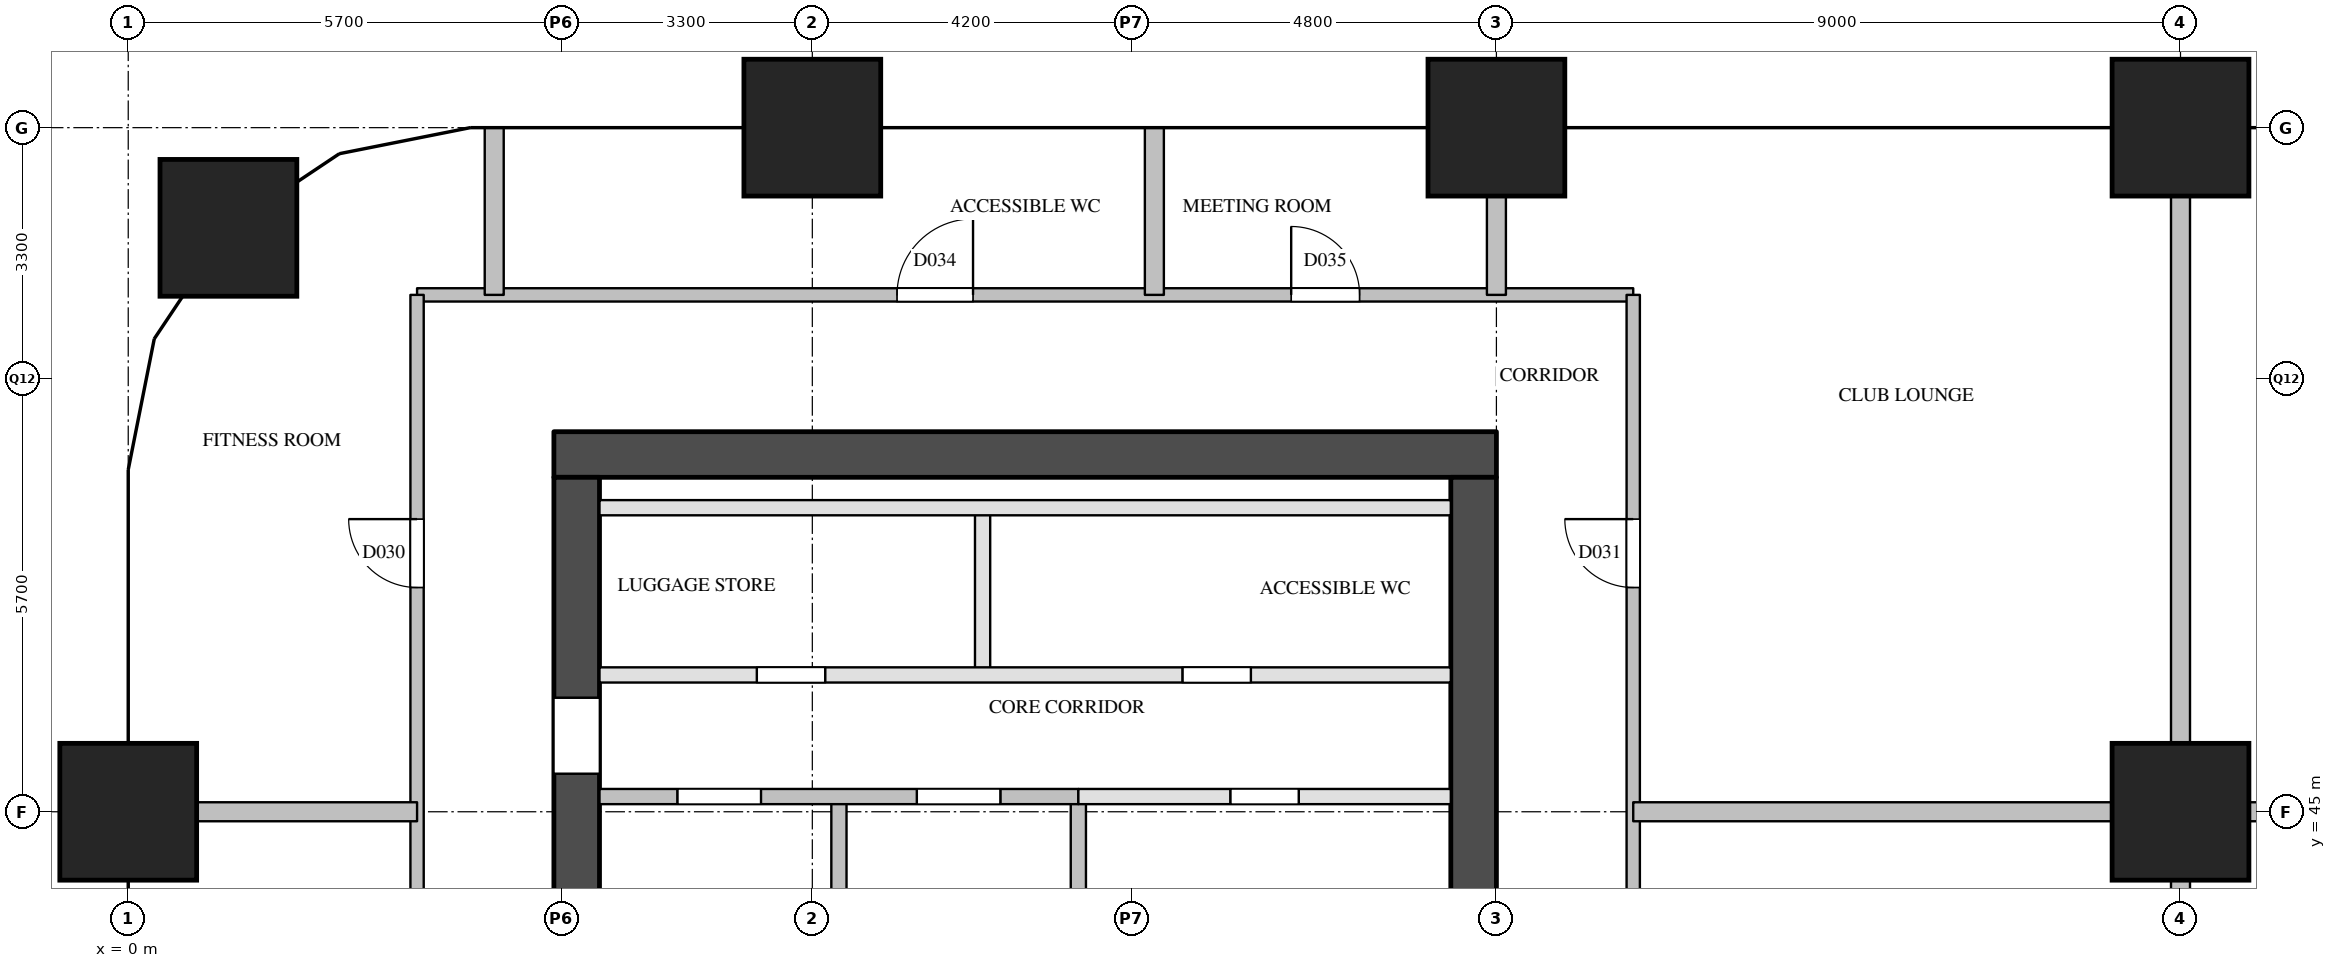
"""IFC4 building model, lengths in metres.
Left out: names, types, materials, properties, quantities, classifications, styles, units other than length and angle.
Written with IfcOpenShell. Run it as: python <this file> out.ifc"""

import sys

from ifc_helpers import new_model, si_unit, direction, frame, frame_2d, origin, origin_2d, place, context, subcontext, project, spatial, rectangle, extrude, element, fill, save


model = new_model("IFC4")
c1 = context("Model", 3, precision=1e-05, world=origin(), true_north=direction((0.0, 1.0)))
c2 = subcontext(c1, "Body", "Model", "MODEL_VIEW")
j1 = project(units=[si_unit("LENGTHUNIT", "METRE"), si_unit("PLANEANGLEUNIT", "RADIAN")], contexts=[c1])
p1 = place(None, origin())
s1 = spatial("IfcSite", under=j1, at=p1, CompositionType="ELEMENT")
p2 = place(p1, origin())
s2 = spatial("IfcBuilding", under=s1, at=p2, CompositionType="ELEMENT")
p3 = place(p2, frame((0.0, 0.0, 100.6)))
s3 = spatial("IfcBuildingStorey", under=s2, at=p3, CompositionType="ELEMENT", Elevation=100.6)
for number, where, z_axis, x_axis in (
    (1, (0.0, 45.0, 0.0), (0.0, 0.0, 1.0), (1.0, 0.0, 0.0)),
    (2, (1.318, 52.682, 0.0), (0.0, 0.0, 1.0), (1.0, 0.0, 0.0)),
    (3, (9.0, 54.0, 0.0), (0.0, 0.0, 1.0), (1.0, 0.0, 0.0)),
    (4, (18.0, 54.0, 0.0), (0.0, 0.0, 1.0), (1.0, 0.0, 0.0)),
    (5, (27.0, 45.0, 0.0), (0.0, 0.0, 1.0), (1.0, 0.0, 0.0)),
    (6, (27.0, 54.0, 0.0), (0.0, 0.0, 1.0), (1.0, 0.0, 0.0)),
):
    element("IfcColumn", number, at=place(p3, frame(where, z_axis=z_axis, x_axis=x_axis)), inside=s3, PredefinedType="COLUMN", context=c2, shape_type="SweptSolid", body=[
        extrude(rectangle(XDim=1.8, YDim=1.8, at=origin_2d()), origin(), (0.0, 0.0, 1.0), 3.8),
    ])
p4 = place(p3, frame((5.6, 49.7, 0.0), z_axis=(0.0, 0.0, 1.0), x_axis=(1.0, 0.0, 0.0)))
e7 = element("IfcWall", 7, at=p4, inside=s3, PredefinedType="SHEAR", context=c2, shape_type="SweptSolid", body=[
    extrude(rectangle(XDim=12.4, YDim=0.6, at=frame_2d((6.2, 0.0))), origin(), (0.0, 0.0, 1.0), 3.5),
])
p5 = place(p3, frame((5.9, 29.1, 0.0), z_axis=(0.0, 0.0, 1.0), x_axis=(0.0, 1.0, 0.0)))
e8 = element("IfcWall", 8, at=p5, inside=s3, PredefinedType="SHEAR", context=c2, shape_type="SweptSolid", body=[
    extrude(rectangle(XDim=20.3, YDim=0.6, at=frame_2d((10.15, 0.0))), origin(), (0.0, 0.0, 1.0), 3.5),
])
p6 = place(p5, frame((3.6, 0.0, 0.0)))
e9 = element("IfcOpeningElement", 9, at=p6, cuts=e8, PredefinedType="OPENING", context=c2, shape_type="SweptSolid", body=[
    extrude(rectangle(XDim=1.8, YDim=2.1, at=frame_2d((0.9, 1.05))), frame((0.0, 0.31, 0.0), z_axis=(0.0, -1.0, 0.0), x_axis=(1.0, 0.0, 0.0)), (0.0, 0.0, 1.0), 0.62),
])
p7 = place(p5, frame((16.4, 0.0, 0.0)))
e10 = element("IfcOpeningElement", 10, at=p7, cuts=e8, PredefinedType="OPENING", context=c2, shape_type="SweptSolid", body=[
    extrude(rectangle(XDim=1.0, YDim=2.1, at=frame_2d((0.5, 1.05))), frame((0.0, 0.31, 0.0), z_axis=(0.0, -1.0, 0.0), x_axis=(1.0, 0.0, 0.0)), (0.0, 0.0, 1.0), 0.62),
])
p8 = place(p3, frame((17.7, 29.1, 0.0), z_axis=(0.0, 0.0, 1.0), x_axis=(0.0, 1.0, 0.0)))
e11 = element("IfcWall", 11, at=p8, inside=s3, PredefinedType="SHEAR", context=c2, shape_type="SweptSolid", body=[
    extrude(rectangle(XDim=20.3, YDim=0.6, at=frame_2d((10.15, 0.0))), origin(), (0.0, 0.0, 1.0), 3.5),
])
p9 = place(p8, frame((1.25, 0.0, 0.0)))
e12 = element("IfcOpeningElement", 12, at=p9, cuts=e11, PredefinedType="OPENING", context=c2, shape_type="SweptSolid", body=[
    extrude(rectangle(XDim=0.7, YDim=2.1, at=frame_2d((0.35, 1.05))), frame((0.0, 0.31, 0.0), z_axis=(0.0, -1.0, 0.0), x_axis=(1.0, 0.0, 0.0)), (0.0, 0.0, 1.0), 0.62),
])
p10 = place(p8, frame((7.05, 0.0, 0.0)))
e13 = element("IfcOpeningElement", 13, at=p10, cuts=e11, PredefinedType="OPENING", context=c2, shape_type="SweptSolid", body=[
    extrude(rectangle(XDim=0.7, YDim=2.1, at=frame_2d((0.35, 1.05))), frame((0.0, 0.31, 0.0), z_axis=(0.0, -1.0, 0.0), x_axis=(1.0, 0.0, 0.0)), (0.0, 0.0, 1.0), 0.62),
])
p11 = place(p3, frame((9.35, 40.9, 0.0), z_axis=(0.0, 0.0, 1.0), x_axis=(0.0, 1.0, 0.0)))
e14 = element("IfcWall", 14, at=p11, inside=s3, PredefinedType="SOLIDWALL", context=c2, shape_type="SweptSolid", body=[
    extrude(rectangle(XDim=4.3, YDim=0.2, at=frame_2d((2.15, 0.0))), origin(), (0.0, 0.0, 1.0), 3.5),
])
p12 = place(p3, frame((11.24, 46.8, 0.0), z_axis=(0.0, 0.0, 1.0), x_axis=(0.0, 1.0, 0.0)))
e15 = element("IfcWall", 15, at=p12, inside=s3, PredefinedType="PARTITIONING", context=c2, shape_type="SweptSolid", body=[
    extrude(rectangle(XDim=2.2, YDim=0.2, at=frame_2d((1.1, 0.0))), origin(), (0.0, 0.0, 1.0), 3.5),
])
p13 = place(p3, frame((12.5, 40.9, 0.0), z_axis=(0.0, 0.0, 1.0), x_axis=(0.0, 1.0, 0.0)))
e16 = element("IfcWall", 16, at=p13, inside=s3, PredefinedType="SOLIDWALL", context=c2, shape_type="SweptSolid", body=[
    extrude(rectangle(XDim=4.3, YDim=0.2, at=frame_2d((2.15, 0.0))), origin(), (0.0, 0.0, 1.0), 3.5),
])
p14 = place(p3, frame((12.5, 45.2, 0.0), z_axis=(0.0, 0.0, 1.0), x_axis=(1.0, 0.0, 0.0)))
e17 = element("IfcWall", 17, at=p14, inside=s3, PredefinedType="PARTITIONING", context=c2, shape_type="SweptSolid", body=[
    extrude(rectangle(XDim=4.9, YDim=0.2, at=frame_2d((2.45, 0.0))), origin(), (0.0, 0.0, 1.0), 3.5),
])
p15 = place(p14, frame((2.0, 0.0, 0.0)))
e18 = element("IfcOpeningElement", 18, at=p15, cuts=e17, PredefinedType="OPENING", context=c2, shape_type="SweptSolid", body=[
    extrude(rectangle(XDim=0.9, YDim=2.1, at=frame_2d((0.45, 1.05))), frame((0.0, 0.11, 0.0), z_axis=(0.0, -1.0, 0.0), x_axis=(1.0, 0.0, 0.0)), (0.0, 0.0, 1.0), 0.22),
])
p16 = place(p3, frame((6.2, 45.2, 0.0), z_axis=(0.0, 0.0, 1.0), x_axis=(1.0, 0.0, 0.0)))
e19 = element("IfcWall", 19, at=p16, inside=s3, PredefinedType="SOLIDWALL", context=c2, shape_type="SweptSolid", body=[
    extrude(rectangle(XDim=6.3, YDim=0.2, at=frame_2d((3.15, 0.0))), origin(), (0.0, 0.0, 1.0), 3.5),
])
p17 = place(p16, frame((1.025, 0.0, 0.0)))
e20 = element("IfcOpeningElement", 20, at=p17, cuts=e19, PredefinedType="OPENING", context=c2, shape_type="SweptSolid", body=[
    extrude(rectangle(XDim=1.1, YDim=2.1, at=frame_2d((0.55, 1.05))), frame((0.0, 0.11, 0.0), z_axis=(0.0, -1.0, 0.0), x_axis=(1.0, 0.0, 0.0)), (0.0, 0.0, 1.0), 0.22),
])
p18 = place(p16, frame((4.175, 0.0, 0.0)))
e21 = element("IfcOpeningElement", 21, at=p18, cuts=e19, PredefinedType="OPENING", context=c2, shape_type="SweptSolid", body=[
    extrude(rectangle(XDim=1.1, YDim=2.1, at=frame_2d((0.55, 1.05))), frame((0.0, 0.11, 0.0), z_axis=(0.0, -1.0, 0.0), x_axis=(1.0, 0.0, 0.0)), (0.0, 0.0, 1.0), 0.22),
])
p19 = place(p3, frame((6.2, 46.8, 0.0), z_axis=(0.0, 0.0, 1.0), x_axis=(1.0, 0.0, 0.0)))
e22 = element("IfcWall", 22, at=p19, inside=s3, PredefinedType="PARTITIONING", context=c2, shape_type="SweptSolid", body=[
    extrude(rectangle(XDim=11.2, YDim=0.2, at=frame_2d((5.6, 0.0))), origin(), (0.0, 0.0, 1.0), 3.5),
])
p20 = place(p19, frame((2.07, 0.0, 0.0)))
e23 = element("IfcOpeningElement", 23, at=p20, cuts=e22, PredefinedType="OPENING", context=c2, shape_type="SweptSolid", body=[
    extrude(rectangle(XDim=0.9, YDim=2.1, at=frame_2d((0.45, 1.05))), frame((0.0, 0.11, 0.0), z_axis=(0.0, -1.0, 0.0), x_axis=(1.0, 0.0, 0.0)), (0.0, 0.0, 1.0), 0.22),
])
p21 = place(p19, frame((7.67, 0.0, 0.0)))
e24 = element("IfcOpeningElement", 24, at=p21, cuts=e22, PredefinedType="OPENING", context=c2, shape_type="SweptSolid", body=[
    extrude(rectangle(XDim=0.9, YDim=2.1, at=frame_2d((0.45, 1.05))), frame((0.0, 0.11, 0.0), z_axis=(0.0, -1.0, 0.0), x_axis=(1.0, 0.0, 0.0)), (0.0, 0.0, 1.0), 0.22),
])
p22 = place(p3, frame((6.2, 49.0, 0.0), z_axis=(0.0, 0.0, 1.0), x_axis=(1.0, 0.0, 0.0)))
e25 = element("IfcWall", 25, at=p22, inside=s3, PredefinedType="PARTITIONING", context=c2, shape_type="SweptSolid", body=[
    extrude(rectangle(XDim=11.2, YDim=0.2, at=frame_2d((5.6, 0.0))), origin(), (0.0, 0.0, 1.0), 3.5),
])
p23 = place(p3, frame((3.8, 51.8, 0.0), z_axis=(0.0, 0.0, 1.0), x_axis=(1.0, 0.0, 0.0)))
e26 = element("IfcWall", 26, at=p23, inside=s3, PredefinedType="PARTITIONING", context=c2, shape_type="SweptSolid", body=[
    extrude(rectangle(XDim=16.0, YDim=0.175, at=frame_2d((8.0, 0.0))), origin(), (0.0, 0.0, 1.0), 3.5),
])
p24 = place(p23, frame((6.314, 0.0, 0.0)))
e27 = element("IfcOpeningElement", 27, at=p24, cuts=e26, PredefinedType="OPENING", context=c2, shape_type="SweptSolid", body=[
    extrude(rectangle(XDim=1.0, YDim=2.1, at=frame_2d((0.5, 1.05))), frame((0.0, 0.097, 0.0), z_axis=(0.0, -1.0, 0.0), x_axis=(1.0, 0.0, 0.0)), (0.0, 0.0, 1.0), 0.195),
])
p25 = place(p23, frame((11.5, 0.0, 0.0)))
e28 = element("IfcOpeningElement", 28, at=p25, cuts=e26, PredefinedType="OPENING", context=c2, shape_type="SweptSolid", body=[
    extrude(rectangle(XDim=0.9, YDim=2.1, at=frame_2d((0.45, 1.05))), frame((0.0, 0.097, 0.0), z_axis=(0.0, -1.0, 0.0), x_axis=(1.0, 0.0, 0.0)), (0.0, 0.0, 1.0), 0.195),
])
p26 = place(p3, frame((3.8, 28.5, 0.0), z_axis=(0.0, 0.0, 1.0), x_axis=(0.0, 1.0, 0.0)))
e29 = element("IfcWall", 29, at=p26, inside=s3, PredefinedType="PARTITIONING", context=c2, shape_type="SweptSolid", body=[
    extrude(rectangle(XDim=23.3, YDim=0.175, at=frame_2d((11.65, 0.0))), origin(), (0.0, 0.0, 1.0), 3.5),
])
p27 = place(p26, frame((3.3, 0.0, 0.0)))
e30 = element("IfcOpeningElement", 30, at=p27, cuts=e29, PredefinedType="OPENING", context=c2, shape_type="SweptSolid", body=[
    extrude(rectangle(XDim=0.9, YDim=2.1, at=frame_2d((0.45, 1.05))), frame((0.0, 0.097, 0.0), z_axis=(0.0, -1.0, 0.0), x_axis=(1.0, 0.0, 0.0)), (0.0, 0.0, 1.0), 0.195),
])
p28 = place(p26, frame((11.55, 0.0, 0.0)))
e31 = element("IfcOpeningElement", 31, at=p28, cuts=e29, PredefinedType="OPENING", context=c2, shape_type="SweptSolid", body=[
    extrude(rectangle(XDim=0.9, YDim=2.1, at=frame_2d((0.45, 1.05))), frame((0.0, 0.097, 0.0), z_axis=(0.0, -1.0, 0.0), x_axis=(1.0, 0.0, 0.0)), (0.0, 0.0, 1.0), 0.195),
])
p29 = place(p26, frame((19.45, 0.0, 0.0)))
e32 = element("IfcOpeningElement", 32, at=p29, cuts=e29, PredefinedType="OPENING", context=c2, shape_type="SweptSolid", body=[
    extrude(rectangle(XDim=0.9, YDim=2.1, at=frame_2d((0.45, 1.05))), frame((0.0, 0.097, 0.0), z_axis=(0.0, -1.0, 0.0), x_axis=(1.0, 0.0, 0.0)), (0.0, 0.0, 1.0), 0.195),
])
p30 = place(p3, frame((19.8, 28.5, 0.0), z_axis=(0.0, 0.0, 1.0), x_axis=(0.0, 1.0, 0.0)))
e33 = element("IfcWall", 33, at=p30, inside=s3, PredefinedType="PARTITIONING", context=c2, shape_type="SweptSolid", body=[
    extrude(rectangle(XDim=23.3, YDim=0.175, at=frame_2d((11.65, 0.0))), origin(), (0.0, 0.0, 1.0), 3.5),
])
p31 = place(p30, frame((3.3, 0.0, 0.0)))
e34 = element("IfcOpeningElement", 34, at=p31, cuts=e33, PredefinedType="OPENING", context=c2, shape_type="SweptSolid", body=[
    extrude(rectangle(XDim=0.9, YDim=2.1, at=frame_2d((0.45, 1.05))), frame((0.0, 0.097, 0.0), z_axis=(0.0, -1.0, 0.0), x_axis=(1.0, 0.0, 0.0)), (0.0, 0.0, 1.0), 0.195),
])
p32 = place(p30, frame((11.5, 0.0, 0.0)))
e35 = element("IfcOpeningElement", 35, at=p32, cuts=e33, PredefinedType="OPENING", context=c2, shape_type="SweptSolid", body=[
    extrude(rectangle(XDim=1.0, YDim=2.1, at=frame_2d((0.5, 1.05))), frame((0.0, 0.097, 0.0), z_axis=(0.0, -1.0, 0.0), x_axis=(1.0, 0.0, 0.0)), (0.0, 0.0, 1.0), 0.195),
])
p33 = place(p30, frame((19.45, 0.0, 0.0)))
e36 = element("IfcOpeningElement", 36, at=p33, cuts=e33, PredefinedType="OPENING", context=c2, shape_type="SweptSolid", body=[
    extrude(rectangle(XDim=0.9, YDim=2.1, at=frame_2d((0.45, 1.05))), frame((0.0, 0.097, 0.0), z_axis=(0.0, -1.0, 0.0), x_axis=(1.0, 0.0, 0.0)), (0.0, 0.0, 1.0), 0.195),
])
p34 = place(p3, frame((0.0, 45.0, 0.0), z_axis=(0.0, 0.0, 1.0), x_axis=(1.0, 0.0, 0.0)))
e37 = element("IfcWall", 37, at=p34, inside=s3, PredefinedType="PARTITIONING", context=c2, shape_type="SweptSolid", body=[
    extrude(rectangle(XDim=3.8, YDim=0.25, at=frame_2d((1.9, 0.0))), origin(), (0.0, 0.0, 1.0), 3.5),
])
p35 = place(p3, frame((19.8, 45.0, 0.0), z_axis=(0.0, 0.0, 1.0), x_axis=(1.0, 0.0, 0.0)))
e38 = element("IfcWall", 38, at=p35, inside=s3, PredefinedType="PARTITIONING", context=c2, shape_type="SweptSolid", body=[
    extrude(rectangle(XDim=14.4, YDim=0.25, at=frame_2d((7.2, 0.0))), origin(), (0.0, 0.0, 1.0), 3.5),
])
for number, where, z_axis, x_axis in (
    (39, (4.815, 51.8, 0.0), (0.0, 0.0, 1.0), (0.0, 1.0, 0.0)),
    (40, (13.5, 51.8, 0.0), (0.0, 0.0, 1.0), (0.0, 1.0, 0.0)),
):
    element("IfcWall", number, at=place(p3, frame(where, z_axis=z_axis, x_axis=x_axis)), inside=s3, PredefinedType="PARTITIONING", context=c2, shape_type="SweptSolid", body=[
        extrude(rectangle(XDim=2.2, YDim=0.25, at=frame_2d((1.1, 0.0))), origin(), (0.0, 0.0, 1.0), 2.5),
    ])
p36 = place(p3, frame((18.0, 51.8, 0.0), z_axis=(0.0, 0.0, 1.0), x_axis=(0.0, 1.0, 0.0)))
e41 = element("IfcWall", 41, at=p36, inside=s3, PredefinedType="PARTITIONING", context=c2, shape_type="SweptSolid", body=[
    extrude(rectangle(XDim=2.2, YDim=0.25, at=frame_2d((1.1, 0.0))), origin(), (0.0, 0.0, 1.0), 3.5),
])
p37 = place(p3, frame((27.0, 36.0, 0.0), z_axis=(0.0, 0.0, 1.0), x_axis=(0.0, 1.0, 0.0)))
e42 = element("IfcWall", 42, at=p37, inside=s3, PredefinedType="PARTITIONING", context=c2, shape_type="SweptSolid", body=[
    extrude(rectangle(XDim=18.0, YDim=0.25, at=frame_2d((9.0, 0.0))), origin(), (0.0, 0.0, 1.0), 2.5),
])
p38 = place(p17, origin())
e43 = element("IfcDoor", 43, at=p38, inside=s3, OperationType="SINGLE_SWING_LEFT", PredefinedType="DOOR", context=c2, shape_type="SweptSolid", body=[
    extrude(rectangle(XDim=1.1, YDim=2.1, at=frame_2d((0.55, 1.05))), frame((0.0, 0.025, 0.0), z_axis=(0.0, -1.0, 0.0), x_axis=(1.0, 0.0, 0.0)), (0.0, 0.0, 1.0), 0.05),
])
fill(e20, e43)
p39 = place(p18, origin())
e44 = element("IfcDoor", 44, at=p39, inside=s3, OperationType="SINGLE_SWING_RIGHT", PredefinedType="DOOR", context=c2, shape_type="SweptSolid", body=[
    extrude(rectangle(XDim=1.1, YDim=2.1, at=frame_2d((0.55, 1.05))), frame((0.0, 0.025, 0.0), z_axis=(0.0, -1.0, 0.0), x_axis=(1.0, 0.0, 0.0)), (0.0, 0.0, 1.0), 0.05),
])
fill(e21, e44)
p40 = place(p7, origin())
e45 = element("IfcDoor", 45, at=p40, inside=s3, OperationType="SINGLE_SWING_RIGHT", PredefinedType="DOOR", context=c2, shape_type="SweptSolid", body=[
    extrude(rectangle(XDim=1.0, YDim=2.1, at=frame_2d((0.5, 1.05))), frame((0.0, 0.025, 0.0), z_axis=(0.0, -1.0, 0.0), x_axis=(1.0, 0.0, 0.0)), (0.0, 0.0, 1.0), 0.05),
])
fill(e10, e45)
p41 = place(p20, origin())
e46 = element("IfcDoor", 46, at=p41, inside=s3, OperationType="SINGLE_SWING_LEFT", PredefinedType="DOOR", context=c2, shape_type="SweptSolid", body=[
    extrude(rectangle(XDim=0.9, YDim=2.1, at=frame_2d((0.45, 1.05))), frame((0.0, 0.025, 0.0), z_axis=(0.0, -1.0, 0.0), x_axis=(1.0, 0.0, 0.0)), (0.0, 0.0, 1.0), 0.05),
])
fill(e23, e46)
p42 = place(p21, origin())
e47 = element("IfcDoor", 47, at=p42, inside=s3, OperationType="SINGLE_SWING_RIGHT", PredefinedType="DOOR", context=c2, shape_type="SweptSolid", body=[
    extrude(rectangle(XDim=0.9, YDim=2.1, at=frame_2d((0.45, 1.05))), frame((0.0, 0.025, 0.0), z_axis=(0.0, -1.0, 0.0), x_axis=(1.0, 0.0, 0.0)), (0.0, 0.0, 1.0), 0.05),
])
fill(e24, e47)
p43 = place(p15, origin())
e48 = element("IfcDoor", 48, at=p43, inside=s3, OperationType="SINGLE_SWING_RIGHT", PredefinedType="DOOR", context=c2, shape_type="SweptSolid", body=[
    extrude(rectangle(XDim=0.9, YDim=2.1, at=frame_2d((0.45, 1.05))), frame((0.0, 0.025, 0.0), z_axis=(0.0, -1.0, 0.0), x_axis=(1.0, 0.0, 0.0)), (0.0, 0.0, 1.0), 0.05),
])
fill(e18, e48)
p44 = place(p29, origin())
e49 = element("IfcDoor", 49, at=p44, inside=s3, OperationType="SINGLE_SWING_RIGHT", PredefinedType="DOOR", context=c2, shape_type="SweptSolid", body=[
    extrude(rectangle(XDim=0.9, YDim=2.1, at=frame_2d((0.45, 1.05))), frame((0.0, 0.025, 0.0), z_axis=(0.0, -1.0, 0.0), x_axis=(1.0, 0.0, 0.0)), (0.0, 0.0, 1.0), 0.05),
])
fill(e32, e49)
p45 = place(p33, origin())
e50 = element("IfcDoor", 50, at=p45, inside=s3, OperationType="SINGLE_SWING_RIGHT", PredefinedType="DOOR", context=c2, shape_type="SweptSolid", body=[
    extrude(rectangle(XDim=0.9, YDim=2.1, at=frame_2d((0.45, 1.05))), frame((0.0, 0.025, 0.0), z_axis=(0.0, -1.0, 0.0), x_axis=(1.0, 0.0, 0.0)), (0.0, 0.0, 1.0), 0.05),
])
fill(e36, e50)
p46 = place(p24, origin())
e51 = element("IfcDoor", 51, at=p46, inside=s3, OperationType="SINGLE_SWING_RIGHT", PredefinedType="DOOR", context=c2, shape_type="SweptSolid", body=[
    extrude(rectangle(XDim=1.0, YDim=2.1, at=frame_2d((0.5, 1.05))), frame((0.0, 0.025, 0.0), z_axis=(0.0, -1.0, 0.0), x_axis=(1.0, 0.0, 0.0)), (0.0, 0.0, 1.0), 0.05),
])
fill(e27, e51)
p47 = place(p25, origin())
e52 = element("IfcDoor", 52, at=p47, inside=s3, OperationType="SINGLE_SWING_LEFT", PredefinedType="DOOR", context=c2, shape_type="SweptSolid", body=[
    extrude(rectangle(XDim=0.9, YDim=2.1, at=frame_2d((0.45, 1.05))), frame((0.0, 0.025, 0.0), z_axis=(0.0, -1.0, 0.0), x_axis=(1.0, 0.0, 0.0)), (0.0, 0.0, 1.0), 0.05),
])
fill(e28, e52)
save(model, sys.argv[1])
